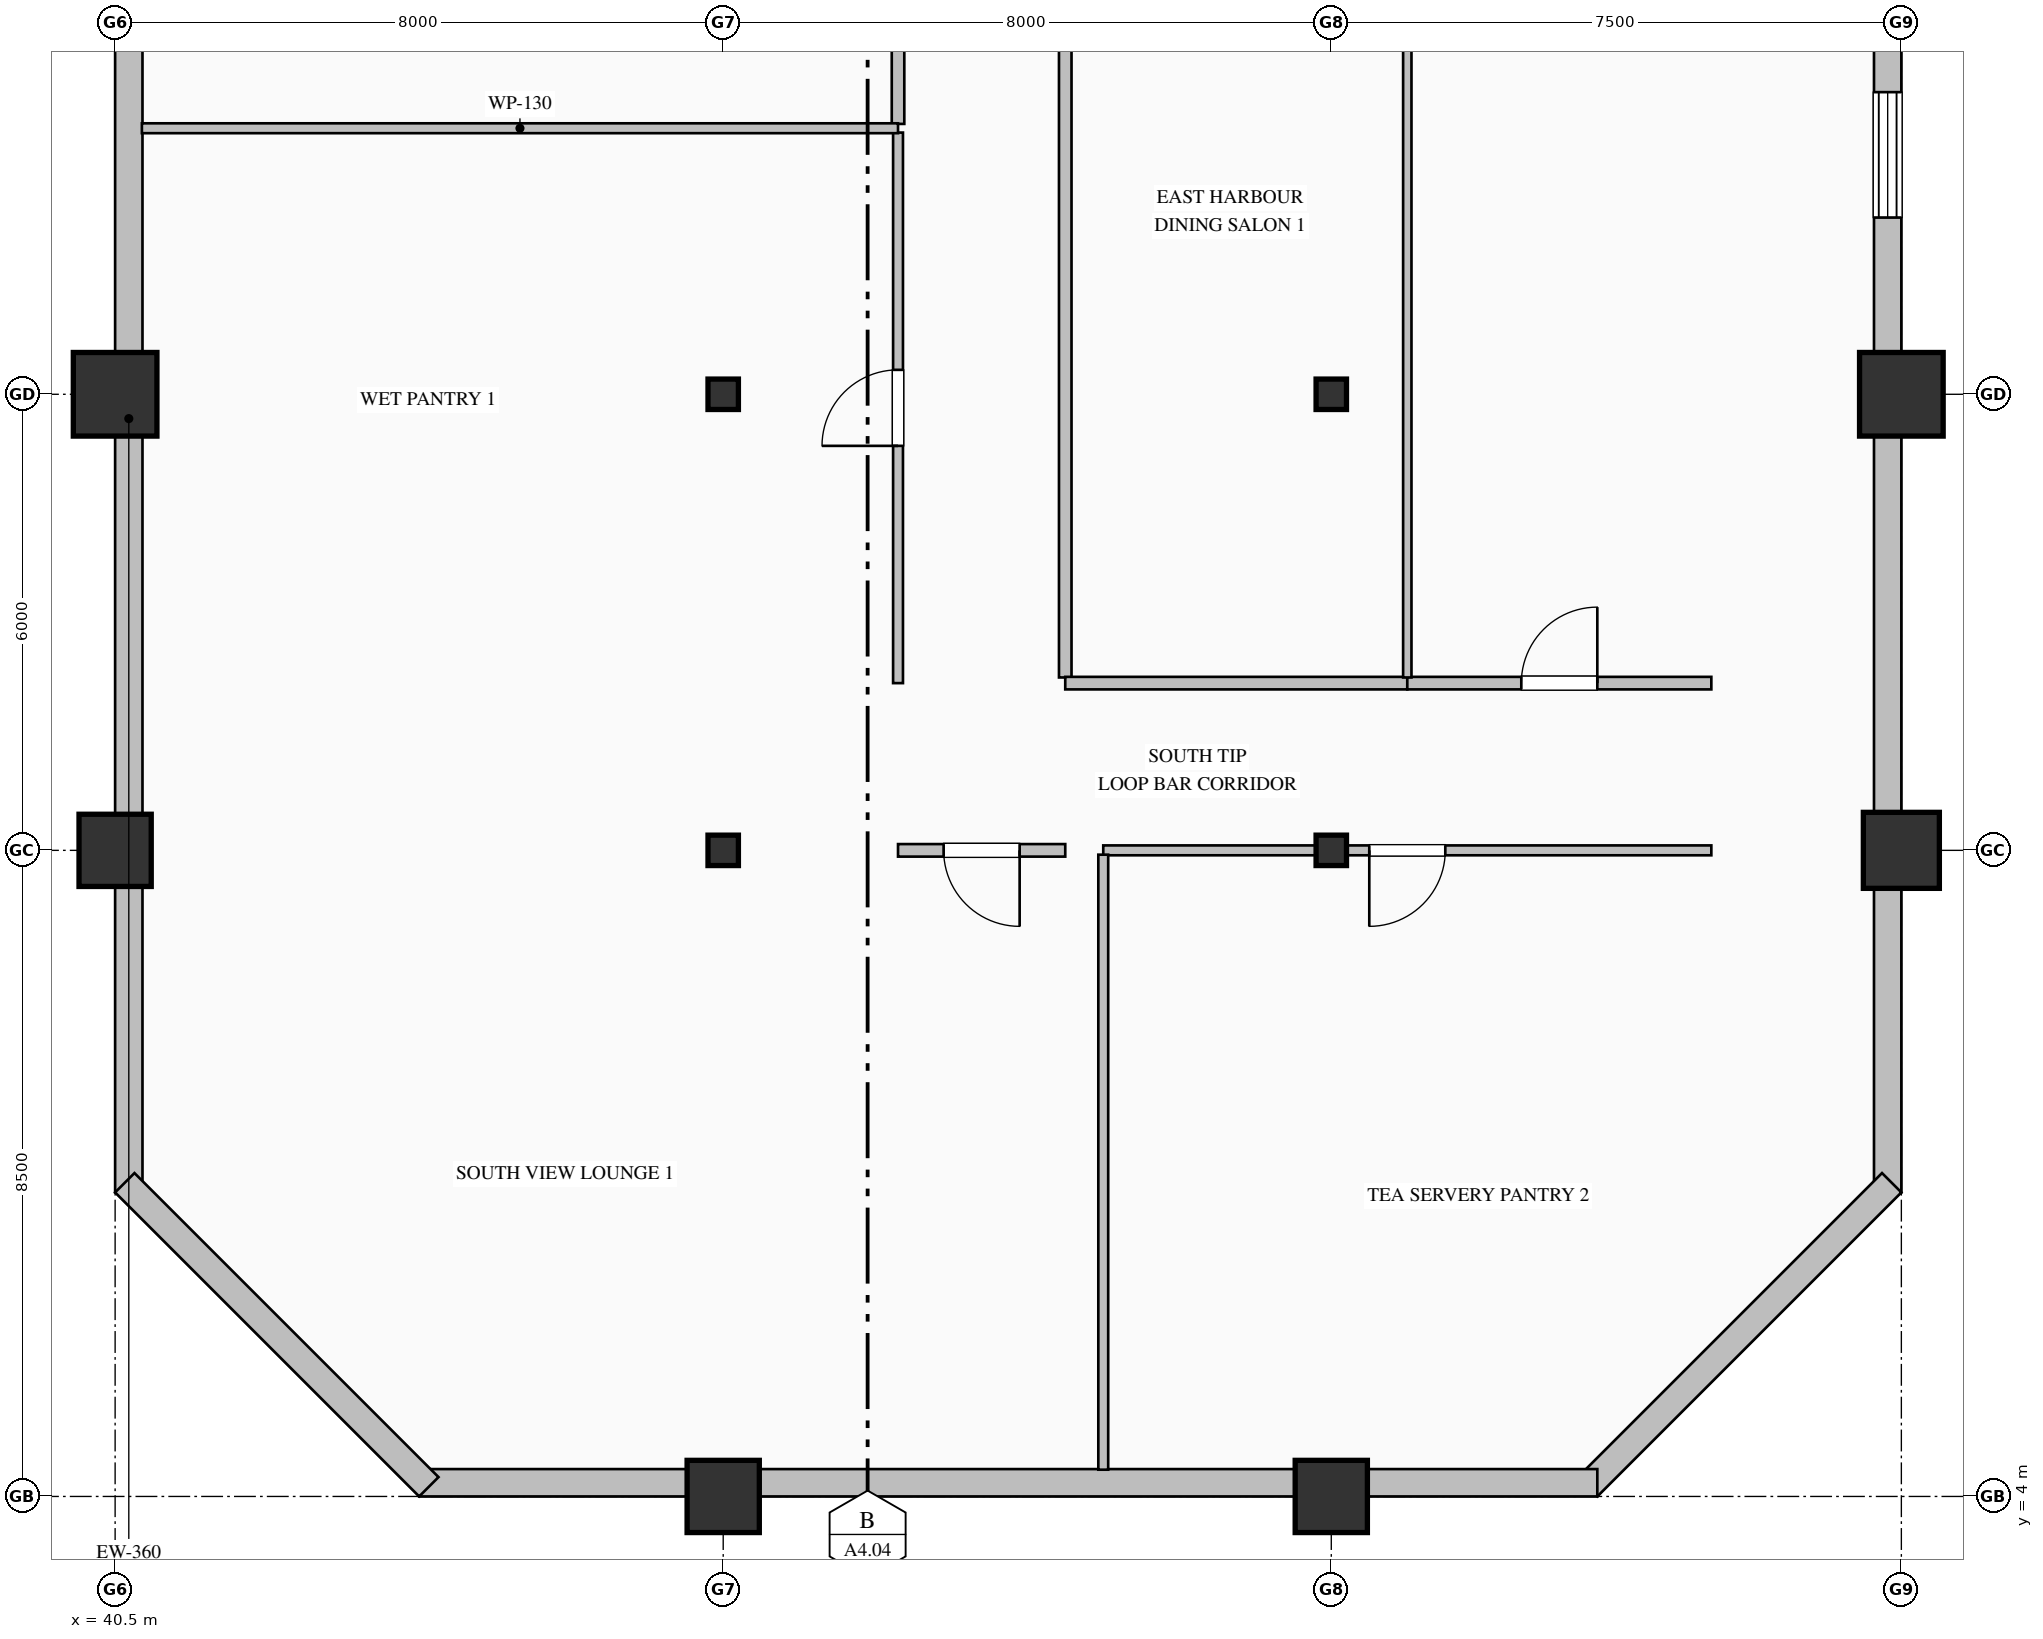
"""IFC4 building model, lengths in metres.
Left out: names, types, materials, properties, quantities, classifications, styles, units other than length and angle.
Written with IfcOpenShell. Run it as: python <this file> out.ifc"""

import sys

from ifc_helpers import new_model, si_unit, direction, frame, frame_2d, origin, origin_2d, place, context, subcontext, project, spatial, rectangle, hollow_rectangle, hollow_circle, i_section, extrude, element, fill, save


model = new_model("IFC4")
c1 = context("Model", 3, precision=1e-05, world=origin(), true_north=direction((0.0, 1.0)))
c2 = subcontext(c1, "Body", "Model", "MODEL_VIEW")
j1 = project(units=[si_unit("LENGTHUNIT", "METRE"), si_unit("PLANEANGLEUNIT", "RADIAN")], contexts=[c1])
p1 = place(None, origin())
s1 = spatial("IfcSite", under=j1, at=p1, CompositionType="ELEMENT")
p2 = place(p1, origin())
s2 = spatial("IfcBuilding", under=s1, at=p2, CompositionType="ELEMENT")
p3 = place(p2, frame((0.0, 0.0, 155.0)))
s3 = spatial("IfcBuildingStorey", under=s2, at=p3, CompositionType="ELEMENT", Elevation=155.0)
p4 = place(p3, frame((40.5, 12.5, 0.0), z_axis=(0.0, 0.0, 1.0), x_axis=(1.0, 0.0, 0.0)))
e1 = element("IfcColumn", 1, at=p4, inside=s3, PredefinedType="COLUMN", context=c2, shape_type="SweptSolid", body=[
    extrude(hollow_rectangle(XDim=0.95, YDim=0.95, WallThickness=0.036, at=origin_2d()), origin(), (0.0, 0.0, 1.0), 4.0),
])
p5 = place(p3, frame((40.5, 18.5, 0.0), z_axis=(0.0, 0.0, 1.0), x_axis=(1.0, 0.0, 0.0)))
e2 = element("IfcColumn", 2, at=p5, inside=s3, PredefinedType="COLUMN", context=c2, shape_type="SweptSolid", body=[
    extrude(hollow_rectangle(XDim=1.1, YDim=1.1, WallThickness=0.04, at=origin_2d()), origin(), (0.0, 0.0, 1.0), 4.0),
])
p6 = place(p3, frame((48.5, 4.0, 0.0), z_axis=(0.0, 0.0, 1.0), x_axis=(1.0, 0.0, 0.0)))
e3 = element("IfcColumn", 3, at=p6, inside=s3, PredefinedType="COLUMN", context=c2, shape_type="SweptSolid", body=[
    extrude(hollow_rectangle(XDim=0.95, YDim=0.95, WallThickness=0.036, at=origin_2d()), origin(), (0.0, 0.0, 1.0), 4.0),
])
for number, where, z_axis, x_axis in (
    (4, (48.5, 12.5, 0.0), (0.0, 0.0, 1.0), (1.0, 0.0, 0.0)),
    (5, (48.5, 18.5, 0.0), (0.0, 0.0, 1.0), (1.0, 0.0, 0.0)),
):
    element("IfcColumn", number, at=place(p3, frame(where, z_axis=z_axis, x_axis=x_axis)), inside=s3, PredefinedType="COLUMN", context=c2, shape_type="SweptSolid", body=[
        extrude(i_section(OverallWidth=0.4, OverallDepth=0.4, WebThickness=0.013, FlangeThickness=0.021, FilletRadius=0.022, at=origin_2d()), origin(), (0.0, 0.0, 1.0), 4.0),
    ])
p7 = place(p3, frame((56.5, 4.0, 0.0), z_axis=(0.0, 0.0, 1.0), x_axis=(1.0, 0.0, 0.0)))
e6 = element("IfcColumn", 6, at=p7, inside=s3, PredefinedType="COLUMN", context=c2, shape_type="SweptSolid", body=[
    extrude(hollow_rectangle(XDim=0.95, YDim=0.95, WallThickness=0.036, at=origin_2d()), origin(), (0.0, 0.0, 1.0), 4.0),
])
for number, where, z_axis, x_axis in (
    (7, (56.5, 12.5, 0.0), (0.0, 0.0, 1.0), (1.0, 0.0, 0.0)),
    (8, (56.5, 18.5, 0.0), (0.0, 0.0, 1.0), (1.0, 0.0, 0.0)),
):
    element("IfcColumn", number, at=place(p3, frame(where, z_axis=z_axis, x_axis=x_axis)), inside=s3, PredefinedType="COLUMN", context=c2, shape_type="SweptSolid", body=[
        extrude(i_section(OverallWidth=0.4, OverallDepth=0.4, WebThickness=0.013, FlangeThickness=0.021, FilletRadius=0.022, at=origin_2d()), origin(), (0.0, 0.0, 1.0), 4.0),
    ])
p8 = place(p3, frame((64.0, 12.5, 0.0), z_axis=(0.0, 0.0, 1.0), x_axis=(1.0, 0.0, 0.0)))
e9 = element("IfcColumn", 9, at=p8, inside=s3, PredefinedType="COLUMN", context=c2, shape_type="SweptSolid", body=[
    extrude(hollow_circle(Radius=0.5, WallThickness=0.036, at=origin_2d()), origin(), (0.0, 0.0, 1.0), 4.0),
])
p9 = place(p3, frame((64.0, 18.5, 0.0), z_axis=(0.0, 0.0, 1.0), x_axis=(1.0, 0.0, 0.0)))
e10 = element("IfcColumn", 10, at=p9, inside=s3, PredefinedType="COLUMN", context=c2, shape_type="SweptSolid", body=[
    extrude(hollow_rectangle(XDim=1.1, YDim=1.1, WallThickness=0.04, at=origin_2d()), origin(), (0.0, 0.0, 1.0), 4.0),
])
p10 = place(p3, frame((40.68, 8.0, 0.0), z_axis=(0.0, 0.0, 1.0), x_axis=(0.0, 1.0, 0.0)))
e11 = element("IfcWall", 11, at=p10, inside=s3, PredefinedType="SOLIDWALL", context=c2, shape_type="SweptSolid", body=[
    extrude(rectangle(XDim=20.36, YDim=0.36, at=frame_2d((10.18, 0.0))), origin(), (0.0, 0.0, 1.0), 3.165),
])
p11 = place(p3, frame((63.82, 36.05, 0.0), z_axis=(0.0, 0.0, 1.0), x_axis=(0.0, -1.0, 0.0)))
e12 = element("IfcWall", 12, at=p11, inside=s3, PredefinedType="SOLIDWALL", context=c2, shape_type="SweptSolid", body=[
    extrude(rectangle(XDim=28.05, YDim=0.36, at=frame_2d((14.025, 0.0))), origin(), (0.0, 0.0, 1.0), 3.265),
])
p12 = place(p11, frame((2.775, 0.0, 0.85)))
e13 = element("IfcOpeningElement", 13, at=p12, cuts=e12, PredefinedType="OPENING", context=c2, shape_type="SweptSolid", body=[
    extrude(rectangle(XDim=1.65, YDim=1.95, at=frame_2d((0.825, 0.975))), frame((0.0, 0.19, 0.0), z_axis=(0.0, -1.0, 0.0), x_axis=(1.0, 0.0, 0.0)), (0.0, 0.0, 1.0), 0.38),
])
p13 = place(p11, frame((10.05, 0.0, 0.85)))
e14 = element("IfcOpeningElement", 14, at=p13, cuts=e12, PredefinedType="OPENING", context=c2, shape_type="SweptSolid", body=[
    extrude(rectangle(XDim=1.5, YDim=1.95, at=frame_2d((0.75, 0.975))), frame((0.0, 0.19, 0.0), z_axis=(0.0, -1.0, 0.0), x_axis=(1.0, 0.0, 0.0)), (0.0, 0.0, 1.0), 0.38),
])
p14 = place(p11, frame((13.575, 0.0, 0.85)))
e15 = element("IfcOpeningElement", 15, at=p14, cuts=e12, PredefinedType="OPENING", context=c2, shape_type="SweptSolid", body=[
    extrude(rectangle(XDim=1.65, YDim=1.95, at=frame_2d((0.825, 0.975))), frame((0.0, 0.19, 0.0), z_axis=(0.0, -1.0, 0.0), x_axis=(1.0, 0.0, 0.0)), (0.0, 0.0, 1.0), 0.38),
])
p15 = place(p3, frame((63.873, 8.127, 0.0), z_axis=(0.0, 0.0, 1.0), x_axis=(-0.707106781187, -0.707106781187, 0.0)))
e16 = element("IfcWall", 16, at=p15, inside=s3, PredefinedType="SOLIDWALL", context=c2, shape_type="SweptSolid", body=[
    extrude(rectangle(XDim=5.657, YDim=0.36, at=frame_2d((2.828, 0.0))), origin(), (0.0, 0.0, 1.0), 3.765),
])
p16 = place(p3, frame((60.0, 4.18, 0.0), z_axis=(0.0, 0.0, 1.0), x_axis=(-1.0, 0.0, 0.0)))
e17 = element("IfcWall", 17, at=p16, inside=s3, PredefinedType="SOLIDWALL", context=c2, shape_type="SweptSolid", body=[
    extrude(rectangle(XDim=15.5, YDim=0.36, at=frame_2d((7.75, 0.0))), origin(), (0.0, 0.0, 1.0), 3.265),
])
p17 = place(p3, frame((44.627, 4.127, 0.0), z_axis=(0.0, 0.0, 1.0), x_axis=(-0.707106781187, 0.707106781187, 0.0)))
e18 = element("IfcWall", 18, at=p17, inside=s3, PredefinedType="SOLIDWALL", context=c2, shape_type="SweptSolid", body=[
    extrude(rectangle(XDim=5.657, YDim=0.36, at=frame_2d((2.828, 0.0))), origin(), (0.0, 0.0, 1.0), 3.765),
])
p18 = place(p3, frame((53.0, 33.525, 0.0), z_axis=(0.0, 0.0, 1.0), x_axis=(0.0, -1.0, 0.0)))
e19 = element("IfcWall", 19, at=p18, inside=s3, PredefinedType="PARTITIONING", context=c2, shape_type="SweptSolid", body=[
    extrude(rectangle(XDim=18.751, YDim=0.165, at=frame_2d((9.375, 0.0))), origin(), (0.0, 0.0, 1.0), 3.765),
])
p19 = place(p18, frame((8.875, 0.0, 0.0)))
e20 = element("IfcOpeningElement", 20, at=p19, cuts=e19, PredefinedType="OPENING", context=c2, shape_type="SweptSolid", body=[
    extrude(rectangle(XDim=1.0, YDim=2.15, at=frame_2d((0.5, 1.075))), frame((0.0, 0.093, 0.0), z_axis=(0.0, -1.0, 0.0), x_axis=(1.0, 0.0, 0.0)), (0.0, 0.0, 1.0), 0.185),
])
p20 = place(p3, frame((50.8, 14.7, 0.0), z_axis=(0.0, 0.0, 1.0), x_axis=(0.0, 1.0, 0.0)))
e21 = element("IfcWall", 21, at=p20, inside=s3, PredefinedType="PARTITIONING", context=c2, shape_type="SweptSolid", body=[
    extrude(rectangle(XDim=7.243, YDim=0.13, at=frame_2d((3.622, 0.0))), origin(), (0.0, 0.0, 1.0), 3.765),
])
p21 = place(p20, frame((3.122, 0.0, 0.0)))
e22 = element("IfcOpeningElement", 22, at=p21, cuts=e21, PredefinedType="OPENING", context=c2, shape_type="SweptSolid", body=[
    extrude(rectangle(XDim=1.0, YDim=2.15, at=frame_2d((0.5, 1.075))), frame((0.0, 0.075, 0.0), z_axis=(0.0, -1.0, 0.0), x_axis=(1.0, 0.0, 0.0)), (0.0, 0.0, 1.0), 0.15),
])
p22 = place(p3, frame((50.8, 22.057, 0.0), z_axis=(0.0, 0.0, 1.0), x_axis=(0.0, 1.0, 0.0)))
e23 = element("IfcWall", 23, at=p22, inside=s3, PredefinedType="PARTITIONING", context=c2, shape_type="SweptSolid", body=[
    extrude(rectangle(XDim=11.469, YDim=0.165, at=frame_2d((5.734, 0.0))), origin(), (0.0, 0.0, 1.0), 3.765),
])
p23 = place(p22, frame((5.234, 0.0, 0.0)))
e24 = element("IfcOpeningElement", 24, at=p23, cuts=e23, PredefinedType="OPENING", context=c2, shape_type="SweptSolid", body=[
    extrude(rectangle(XDim=1.0, YDim=2.15, at=frame_2d((0.5, 1.075))), frame((0.0, 0.093, 0.0), z_axis=(0.0, -1.0, 0.0), x_axis=(1.0, 0.0, 0.0)), (0.0, 0.0, 1.0), 0.185),
])
p24 = place(p3, frame((53.0, 12.5, 0.0), z_axis=(0.0, 0.0, 1.0), x_axis=(-1.0, 0.0, 0.0)))
e25 = element("IfcWall", 25, at=p24, inside=s3, PredefinedType="PARTITIONING", context=c2, shape_type="SweptSolid", body=[
    extrude(rectangle(XDim=2.2, YDim=0.165, at=frame_2d((1.1, 0.0))), origin(), (0.0, 0.0, 1.0), 3.157),
])
p25 = place(p24, frame((0.6, 0.0, 0.0)))
e26 = element("IfcOpeningElement", 26, at=p25, cuts=e25, PredefinedType="OPENING", context=c2, shape_type="SweptSolid", body=[
    extrude(rectangle(XDim=1.0, YDim=2.15, at=frame_2d((0.5, 1.075))), frame((0.0, 0.093, 0.0), z_axis=(0.0, -1.0, 0.0), x_axis=(1.0, 0.0, 0.0)), (0.0, 0.0, 1.0), 0.185),
])
p26 = place(p3, frame((53.0, 14.7, 0.0), z_axis=(0.0, 0.0, 1.0), x_axis=(1.0, 0.0, 0.0)))
e27 = element("IfcWall", 27, at=p26, inside=s3, PredefinedType="PARTITIONING", context=c2, shape_type="SweptSolid", body=[
    extrude(rectangle(XDim=4.5, YDim=0.165, at=frame_2d((2.25, 0.0))), origin(), (0.0, 0.0, 1.0), 3.765),
])
p27 = place(p3, frame((57.5, 14.7, 0.0), z_axis=(0.0, 0.0, 1.0), x_axis=(1.0, 0.0, 0.0)))
e28 = element("IfcWall", 28, at=p27, inside=s3, PredefinedType="PARTITIONING", context=c2, shape_type="SweptSolid", body=[
    extrude(rectangle(XDim=4.0, YDim=0.165, at=frame_2d((2.0, 0.0))), origin(), (0.0, 0.0, 1.0), 3.765),
])
p28 = place(p27, frame((1.5, 0.0, 0.0)))
e29 = element("IfcOpeningElement", 29, at=p28, cuts=e28, PredefinedType="OPENING", context=c2, shape_type="SweptSolid", body=[
    extrude(rectangle(XDim=1.0, YDim=2.15, at=frame_2d((0.5, 1.075))), frame((0.0, 0.093, 0.0), z_axis=(0.0, -1.0, 0.0), x_axis=(1.0, 0.0, 0.0)), (0.0, 0.0, 1.0), 0.185),
])
p29 = place(p3, frame((61.5, 12.5, 0.0), z_axis=(0.0, 0.0, 1.0), x_axis=(-1.0, 0.0, 0.0)))
e30 = element("IfcWall", 30, at=p29, inside=s3, PredefinedType="PARTITIONING", context=c2, shape_type="SweptSolid", body=[
    extrude(rectangle(XDim=8.0, YDim=0.13, at=frame_2d((4.0, 0.0))), origin(), (0.0, 0.0, 1.0), 3.157),
])
p30 = place(p29, frame((3.5, 0.0, 0.0)))
e31 = element("IfcOpeningElement", 31, at=p30, cuts=e30, PredefinedType="OPENING", context=c2, shape_type="SweptSolid", body=[
    extrude(rectangle(XDim=1.0, YDim=2.15, at=frame_2d((0.5, 1.075))), frame((0.0, 0.075, 0.0), z_axis=(0.0, -1.0, 0.0), x_axis=(1.0, 0.0, 0.0)), (0.0, 0.0, 1.0), 0.15),
])
p31 = place(p3, frame((57.5, 36.0, 0.0), z_axis=(0.0, 0.0, 1.0), x_axis=(0.0, -1.0, 0.0)))
e32 = element("IfcWall", 32, at=p31, inside=s3, PredefinedType="MOVABLE", context=c2, shape_type="SweptSolid", body=[
    extrude(rectangle(XDim=21.226, YDim=0.11, at=frame_2d((10.613, 0.0))), origin(), (0.0, 0.0, 1.0), 3.765),
])
p32 = place(p3, frame((40.852, 22.0, 0.0), z_axis=(0.0, 0.0, 1.0), x_axis=(1.0, 0.0, 0.0)))
e33 = element("IfcWall", 33, at=p32, inside=s3, PredefinedType="PARTITIONING", context=c2, shape_type="SweptSolid", body=[
    extrude(rectangle(XDim=9.948, YDim=0.13, at=frame_2d((4.974, 0.0))), origin(), (0.0, 0.0, 1.0), 3.765),
])
p33 = place(p3, frame((53.5, 12.443, 0.0), z_axis=(0.0, 0.0, 1.0), x_axis=(0.0, -1.0, 0.0)))
e34 = element("IfcWall", 34, at=p33, inside=s3, PredefinedType="PARTITIONING", context=c2, shape_type="SweptSolid", body=[
    extrude(rectangle(XDim=8.091, YDim=0.13, at=frame_2d((4.045, 0.0))), origin(), (0.0, 0.0, 1.0), 3.765),
])
p34 = place(p14, origin())
e35 = element("IfcWindow", 35, at=p34, inside=s3, PartitioningType="DOUBLE_PANEL_VERTICAL", PredefinedType="WINDOW", context=c2, shape_type="SweptSolid", body=[
    extrude(rectangle(XDim=1.65, YDim=1.95, at=frame_2d((0.825, 0.975))), frame((0.0, 0.15, 0.0), z_axis=(0.0, -1.0, 0.0), x_axis=(1.0, 0.0, 0.0)), (0.0, 0.0, 1.0), 0.06),
])
fill(e15, e35)
p35 = place(p28, origin())
e36 = element("IfcDoor", 36, at=p35, inside=s3, OperationType="SINGLE_SWING_RIGHT", PredefinedType="DOOR", context=c2, shape_type="SweptSolid", body=[
    extrude(rectangle(XDim=1.0, YDim=2.15, at=frame_2d((0.5, 1.075))), frame((0.0, 0.025, 0.0), z_axis=(0.0, -1.0, 0.0), x_axis=(1.0, 0.0, 0.0)), (0.0, 0.0, 1.0), 0.05),
])
fill(e29, e36)
p36 = place(p21, origin())
e37 = element("IfcDoor", 37, at=p36, inside=s3, OperationType="SINGLE_SWING_LEFT", PredefinedType="DOOR", context=c2, shape_type="SweptSolid", body=[
    extrude(rectangle(XDim=1.0, YDim=2.15, at=frame_2d((0.5, 1.075))), frame((0.0, 0.025, 0.0), z_axis=(0.0, -1.0, 0.0), x_axis=(1.0, 0.0, 0.0)), (0.0, 0.0, 1.0), 0.05),
])
fill(e22, e37)
p37 = place(p25, origin())
e38 = element("IfcDoor", 38, at=p37, inside=s3, OperationType="SINGLE_SWING_LEFT", PredefinedType="DOOR", context=c2, shape_type="SweptSolid", body=[
    extrude(rectangle(XDim=1.0, YDim=2.15, at=frame_2d((0.5, 1.075))), frame((0.0, 0.025, 0.0), z_axis=(0.0, -1.0, 0.0), x_axis=(1.0, 0.0, 0.0)), (0.0, 0.0, 1.0), 0.05),
])
fill(e26, e38)
p38 = place(p30, origin())
e39 = element("IfcDoor", 39, at=p38, inside=s3, OperationType="SINGLE_SWING_RIGHT", PredefinedType="DOOR", context=c2, shape_type="SweptSolid", body=[
    extrude(rectangle(XDim=1.0, YDim=2.15, at=frame_2d((0.5, 1.075))), frame((0.0, 0.025, 0.0), z_axis=(0.0, -1.0, 0.0), x_axis=(1.0, 0.0, 0.0)), (0.0, 0.0, 1.0), 0.05),
])
fill(e31, e39)
save(model, sys.argv[1])
